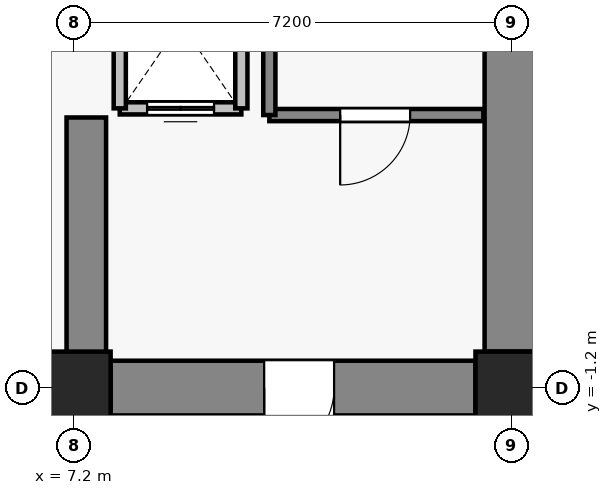
"""IFC4 building model, lengths in metres.
Left out: names, types, materials, properties, quantities, classifications, styles, units other than length and angle.
Written with IfcOpenShell. Run it as: python <this file> out.ifc"""

import sys

from ifc_helpers import new_model, si_unit, direction, frame, frame_2d, origin, origin_2d, place, context, subcontext, project, spatial, rectangle, extrude, source, transform, mapped, element, fill, save


model = new_model("IFC4")
c1 = context("Model", 3, precision=1e-05, world=origin(), true_north=direction((0.0, 1.0)))
c2 = subcontext(c1, "Body", "Model", "MODEL_VIEW")
j1 = project(units=[si_unit("LENGTHUNIT", "METRE"), si_unit("PLANEANGLEUNIT", "RADIAN")], contexts=[c1])
p1 = place(None, origin())
s1 = spatial("IfcSite", under=j1, at=p1, CompositionType="ELEMENT")
p2 = place(p1, origin())
s2 = spatial("IfcBuilding", under=s1, at=p2, CompositionType="ELEMENT")
p3 = place(p2, frame((0.0, 0.0, 63.7)))
s3 = spatial("IfcBuildingStorey", under=s2, at=p3, CompositionType="ELEMENT", Elevation=63.7)
for number, where, z_axis, x_axis in (
    (1, (7.2, -1.2, 0.0), (0.0, 0.0, 1.0), (1.0, 0.0, 0.0)),
    (2, (14.4, -1.2, 0.0), (0.0, 0.0, 1.0), (1.0, 0.0, 0.0)),
):
    element("IfcColumn", number, at=place(p3, frame(where, z_axis=z_axis, x_axis=x_axis)), inside=s3, PredefinedType="COLUMN", context=c2, shape_type="SweptSolid", body=[
        extrude(rectangle(XDim=1.2, YDim=1.2, at=origin_2d()), origin(), (0.0, 0.0, 1.0), 3.3),
    ])
p4 = place(p3, frame((14.4, -0.6, 0.0), z_axis=(0.0, 0.0, 1.0), x_axis=(0.0, 1.0, 0.0)))
e3 = element("IfcWall", 3, at=p4, inside=s3, PredefinedType="SHEAR", context=c2, shape_type="SweptSolid", body=[
    extrude(rectangle(XDim=6.6, YDim=0.9, at=frame_2d((3.3, 0.0))), origin(), (0.0, 0.0, 1.0), 3.075),
])
p5 = place(p3, frame((13.8, -1.2, 0.0), z_axis=(0.0, 0.0, 1.0), x_axis=(-1.0, 0.0, 0.0)))
e4 = element("IfcWall", 4, at=p5, inside=s3, PredefinedType="SHEAR", context=c2, shape_type="SweptSolid", body=[
    extrude(rectangle(XDim=6.0, YDim=0.9, at=frame_2d((3.0, 0.0))), origin(), (0.0, 0.0, 1.0), 3.075),
])
p6 = place(p5, frame((2.325, 0.0, 0.0)))
e5 = element("IfcOpeningElement", 5, at=p6, cuts=e4, PredefinedType="OPENING", context=c2, shape_type="SweptSolid", body=[
    extrude(rectangle(XDim=1.15, YDim=2.15, at=frame_2d((0.575, 1.075))), frame((0.0, 0.46, 0.0), z_axis=(0.0, -1.0, 0.0), x_axis=(1.0, 0.0, 0.0)), (0.0, 0.0, 1.0), 0.92),
])
p7 = place(p3, frame((7.4, -0.75, 0.0), z_axis=(0.0, 0.0, 1.0), x_axis=(0.0, 1.0, 0.0)))
e6 = element("IfcWall", 6, at=p7, inside=s3, PredefinedType="SHEAR", context=c2, shape_type="SweptSolid", body=[
    extrude(rectangle(XDim=4.0, YDim=0.65, at=frame_2d((2.0, 0.0))), origin(), (0.0, 0.0, 1.0), 3.075),
])
p8 = place(p3, frame((9.95, 3.4, 0.0), z_axis=(0.0, 0.0, 1.0), x_axis=(-1.0, 0.0, 0.0)))
e7 = element("IfcWall", 7, at=p8, inside=s3, PredefinedType="SOLIDWALL", context=c2, shape_type="SweptSolid", body=[
    extrude(rectangle(XDim=2.0, YDim=0.2, at=frame_2d((1.0, 0.0))), origin(), (0.0, 0.0, 1.0), 3.075),
])
p9 = place(p8, frame((0.45, 0.0, 0.0)))
e8 = element("IfcOpeningElement", 8, at=p9, cuts=e7, PredefinedType="OPENING", context=c2, shape_type="SweptSolid", body=[
    extrude(rectangle(XDim=1.1, YDim=2.2, at=frame_2d((0.55, 1.1))), frame((0.0, 0.11, 0.0), z_axis=(0.0, -1.0, 0.0), x_axis=(1.0, 0.0, 0.0)), (0.0, 0.0, 1.0), 0.22),
])
for number, where, z_axis, x_axis in (
    (9, (7.95, 3.4, 0.0), (0.0, 0.0, 1.0), (0.0, 1.0, 0.0)),
    (10, (9.95, 6.2, 0.0), (0.0, 0.0, 1.0), (0.0, -1.0, 0.0)),
):
    element("IfcWall", number, at=place(p3, frame(where, z_axis=z_axis, x_axis=x_axis)), inside=s3, PredefinedType="SOLIDWALL", context=c2, shape_type="SweptSolid", body=[
        extrude(rectangle(XDim=2.8, YDim=0.2, at=frame_2d((1.4, 0.0))), origin(), (0.0, 0.0, 1.0), 3.075),
    ])
p10 = place(p3, frame((13.93, 3.29, 0.0), z_axis=(0.0, 0.0, 1.0), x_axis=(-1.0, 0.0, 0.0)))
e11 = element("IfcWall", 11, at=p10, inside=s3, PredefinedType="SOLIDWALL", context=c2, shape_type="SweptSolid", body=[
    extrude(rectangle(XDim=3.52, YDim=0.2, at=frame_2d((1.76, 0.0))), origin(), (0.0, 0.0, 1.0), 3.075),
])
p11 = place(p10, frame((1.205, 0.0, 0.0)))
e12 = element("IfcOpeningElement", 12, at=p11, cuts=e11, PredefinedType="OPENING", context=c2, shape_type="SweptSolid", body=[
    extrude(rectangle(XDim=1.15, YDim=2.15, at=frame_2d((0.575, 1.075))), frame((0.0, 0.11, 0.0), z_axis=(0.0, -1.0, 0.0), x_axis=(1.0, 0.0, 0.0)), (0.0, 0.0, 1.0), 0.22),
])
p12 = place(p3, frame((10.41, 3.29, 0.0), z_axis=(0.0, 0.0, 1.0), x_axis=(0.0, 1.0, 0.0)))
e13 = element("IfcWall", 13, at=p12, inside=s3, PredefinedType="SOLIDWALL", context=c2, shape_type="SweptSolid", body=[
    extrude(rectangle(XDim=8.84, YDim=0.2, at=frame_2d((4.42, 0.0))), origin(), (0.0, 0.0, 1.0), 3.075),
])
m1 = source(origin(), c2, "Body", "SweptSolid", [
    extrude(rectangle(XDim=1.1, YDim=2.2, at=frame_2d((0.55, 1.1))), frame((0.0, 0.025, 0.0), z_axis=(0.0, -1.0, 0.0), x_axis=(1.0, 0.0, 0.0)), (0.0, 0.0, 1.0), 0.05),
])
p13 = place(p9, origin())
e14 = element("IfcDoor", 14, at=p13, inside=s3, OperationType="DOUBLE_DOOR_SLIDING", PredefinedType="DOOR", context=c2, shape_type="MappedRepresentation", body=[
    mapped(m1, transform((0.0, 0.0, 0.0), x_axis=(1.0, 0.0, 0.0), y_axis=(0.0, 1.0, 0.0), z_axis=(0.0, 0.0, 1.0), scale=1.0)),
])
fill(e8, e14)
m2 = source(origin(), c2, "Body", "SweptSolid", [
    extrude(rectangle(XDim=1.15, YDim=2.15, at=frame_2d((0.575, 1.075))), frame((0.0, 0.025, 0.0), z_axis=(0.0, -1.0, 0.0), x_axis=(1.0, 0.0, 0.0)), (0.0, 0.0, 1.0), 0.05),
])
p14 = place(p11, origin())
e15 = element("IfcDoor", 15, at=p14, inside=s3, OperationType="SINGLE_SWING_RIGHT", PredefinedType="DOOR", context=c2, shape_type="MappedRepresentation", body=[
    mapped(m2, transform((0.0, 0.0, 0.0), x_axis=(1.0, 0.0, 0.0), y_axis=(0.0, 1.0, 0.0), z_axis=(0.0, 0.0, 1.0), scale=1.0)),
])
fill(e12, e15)
p15 = place(p6, origin())
e16 = element("IfcDoor", 16, at=p15, inside=s3, OperationType="SINGLE_SWING_RIGHT", PredefinedType="DOOR", context=c2, shape_type="MappedRepresentation", body=[
    mapped(m2, transform((0.0, 0.0, 0.0), x_axis=(1.0, 0.0, 0.0), y_axis=(0.0, 1.0, 0.0), z_axis=(0.0, 0.0, 1.0), scale=1.0)),
])
fill(e5, e16)
save(model, sys.argv[1])
